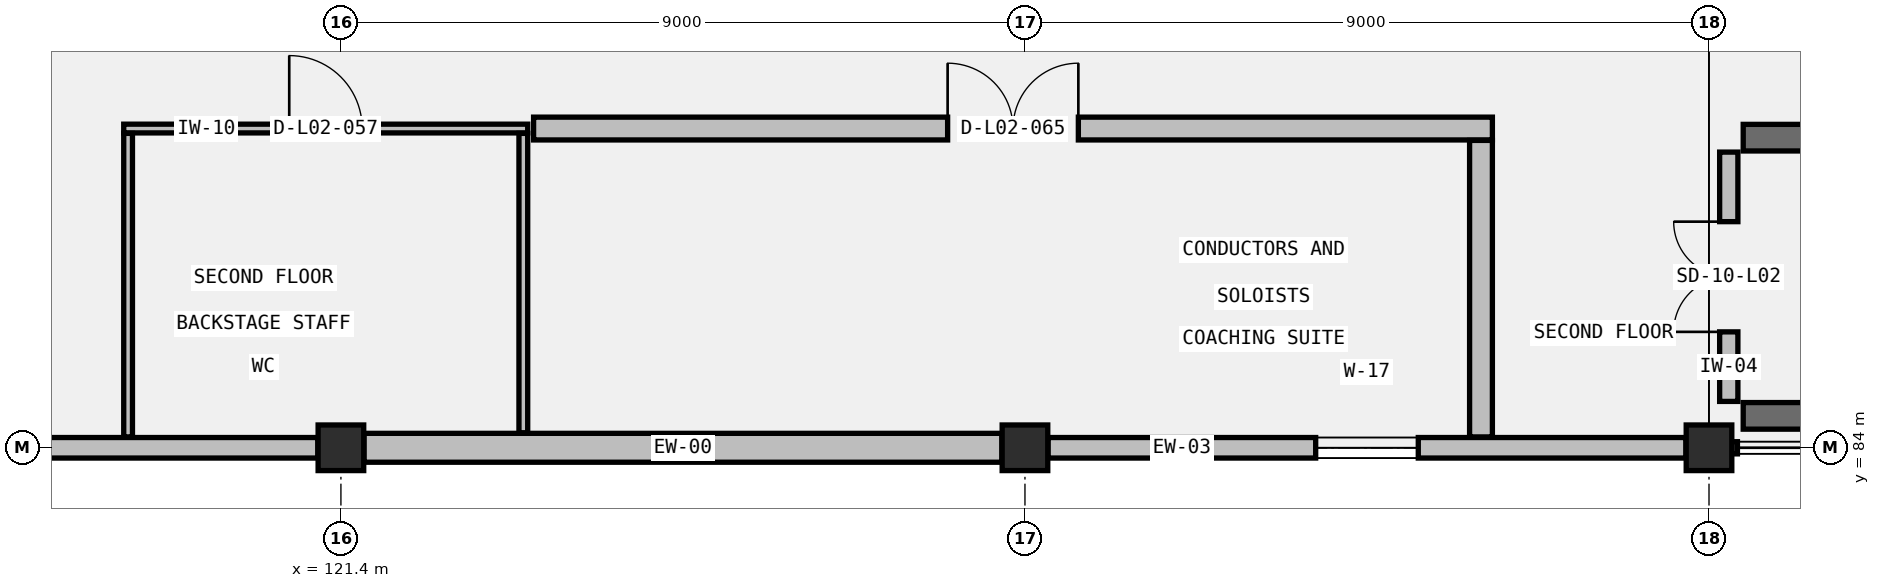
"""IFC4 building model, lengths in metres.
Left out: names, types, materials, properties, quantities, classifications, styles, units other than length and angle.
Written with IfcOpenShell. Run it as: python <this file> out.ifc"""

import sys

from ifc_helpers import new_model, si_unit, direction, frame, frame_2d, origin, origin_2d, place, context, subcontext, project, spatial, rectangle, extrude, element, fill, save


model = new_model("IFC4")
c1 = context("Model", 3, precision=1e-05, world=origin(), true_north=direction((0.0, 1.0)))
c2 = subcontext(c1, "Body", "Model", "MODEL_VIEW")
j1 = project(units=[si_unit("LENGTHUNIT", "METRE"), si_unit("PLANEANGLEUNIT", "RADIAN")], contexts=[c1])
p1 = place(None, origin())
s1 = spatial("IfcSite", under=j1, at=p1, CompositionType="ELEMENT")
p2 = place(p1, origin())
s2 = spatial("IfcBuilding", under=s1, at=p2, CompositionType="ELEMENT")
p3 = place(p2, frame((0.0, 0.0, 10.0)))
s3 = spatial("IfcBuildingStorey", under=s2, at=p3, CompositionType="ELEMENT", Elevation=10.0)
for number, where, z_axis, x_axis in (
    (1, (121.4, 84.0, 0.0), (0.0, 0.0, 1.0), (1.0, 0.0, 0.0)),
    (2, (130.4, 84.0, 0.0), (0.0, 0.0, 1.0), (1.0, 0.0, 0.0)),
    (3, (139.4, 84.0, 0.0), (0.0, 0.0, 1.0), (1.0, 0.0, 0.0)),
):
    element("IfcColumn", number, at=place(p3, frame(where, z_axis=z_axis, x_axis=x_axis)), inside=s3, PredefinedType="COLUMN", context=c2, shape_type="SweptSolid", body=[
        extrude(rectangle(XDim=0.6, YDim=0.6, at=origin_2d()), origin(), (0.0, 0.0, 1.0), 4.6),
    ])
for number, where, z_axis, x_axis in (
    (4, (139.85, 84.42, 0.0), (0.0, 0.0, 1.0), (1.0, 0.0, 0.0)),
    (5, (148.0, 88.08, 0.0), (0.0, 0.0, 1.0), (-1.0, 0.0, 0.0)),
):
    element("IfcWall", number, at=place(p3, frame(where, z_axis=z_axis, x_axis=x_axis)), inside=s3, PredefinedType="SHEAR", context=c2, shape_type="SweptSolid", body=[
        extrude(rectangle(XDim=8.15, YDim=0.35, at=frame_2d((4.075, 0.0))), origin(), (0.0, 0.0, 1.0), 4.36),
    ])
p4 = place(p3, frame((112.779, 84.0, 0.0), z_axis=(0.0, 0.0, 1.0), x_axis=(1.0, 0.0, 0.0)))
e6 = element("IfcWall", 6, at=p4, inside=s3, PredefinedType="STANDARD", context=c2, shape_type="SweptSolid", body=[
    extrude(rectangle(XDim=8.317, YDim=0.27, at=frame_2d((4.158, 0.0))), origin(), (0.0, 0.0, 1.0), 3.738),
])
p5 = place(p4, frame((3.684, 0.0, 0.95)))
e7 = element("IfcOpeningElement", 7, at=p5, cuts=e6, PredefinedType="OPENING", context=c2, shape_type="SweptSolid", body=[
    extrude(rectangle(XDim=0.95, YDim=1.55, at=frame_2d((0.475, 0.775))), frame((0.0, 0.145, 0.0), z_axis=(0.0, -1.0, 0.0), x_axis=(1.0, 0.0, 0.0)), (0.0, 0.0, 1.0), 0.29),
])
p6 = place(p3, frame((121.704, 84.0, 0.0), z_axis=(0.0, 0.0, 1.0), x_axis=(1.0, 0.0, 0.0)))
e8 = element("IfcWall", 8, at=p6, inside=s3, PredefinedType="STANDARD", context=c2, shape_type="SweptSolid", body=[
    extrude(rectangle(XDim=8.392, YDim=0.38, at=frame_2d((4.196, 0.0))), origin(), (0.0, 0.0, 1.0), 3.738),
])
p7 = place(p3, frame((130.704, 84.0, 0.0), z_axis=(0.0, 0.0, 1.0), x_axis=(1.0, 0.0, 0.0)))
e9 = element("IfcWall", 9, at=p7, inside=s3, PredefinedType="STANDARD", context=c2, shape_type="SweptSolid", body=[
    extrude(rectangle(XDim=8.392, YDim=0.27, at=frame_2d((4.196, 0.0))), origin(), (0.0, 0.0, 1.0), 3.738),
])
p8 = place(p7, frame((3.521, 0.0, 0.95)))
e10 = element("IfcOpeningElement", 10, at=p8, cuts=e9, PredefinedType="OPENING", context=c2, shape_type="SweptSolid", body=[
    extrude(rectangle(XDim=1.35, YDim=1.85, at=frame_2d((0.675, 0.925))), frame((0.0, 0.145, 0.0), z_axis=(0.0, -1.0, 0.0), x_axis=(1.0, 0.0, 0.0)), (0.0, 0.0, 1.0), 0.29),
])
p9 = place(p3, frame((139.66, 84.61, 0.0), z_axis=(0.0, 0.0, 1.0), x_axis=(0.0, 1.0, 0.0)))
e11 = element("IfcWall", 11, at=p9, inside=s3, PredefinedType="STANDARD", context=c2, shape_type="SweptSolid", body=[
    extrude(rectangle(XDim=3.28, YDim=0.24, at=frame_2d((1.64, 0.0))), origin(), (0.0, 0.0, 1.0), 4.36),
])
p10 = place(p9, frame((0.915, 0.0, 0.0)))
e12 = element("IfcOpeningElement", 12, at=p10, cuts=e11, PredefinedType="OPENING", context=c2, shape_type="SweptSolid", body=[
    extrude(rectangle(XDim=1.45, YDim=2.2, at=frame_2d((0.725, 1.1))), frame((0.0, 0.13, 0.0), z_axis=(0.0, -1.0, 0.0), x_axis=(1.0, 0.0, 0.0)), (0.0, 0.0, 1.0), 0.26),
])
p11 = place(p3, frame((118.542, 88.2, 0.0), z_axis=(0.0, 0.0, 1.0), x_axis=(1.0, 0.0, 0.0)))
e13 = element("IfcWall", 13, at=p11, inside=s3, PredefinedType="PARTITIONING", context=c2, shape_type="SweptSolid", body=[
    extrude(rectangle(XDim=5.315, YDim=0.115, at=frame_2d((2.657, 0.0))), origin(), (0.0, 0.0, 1.0), 3.738),
])
p12 = place(p11, frame((2.177, 0.0, 0.0)))
e14 = element("IfcOpeningElement", 14, at=p12, cuts=e13, PredefinedType="OPENING", context=c2, shape_type="SweptSolid", body=[
    extrude(rectangle(XDim=0.96, YDim=2.08, at=frame_2d((0.48, 1.04))), frame((0.0, 0.067, 0.0), z_axis=(0.0, -1.0, 0.0), x_axis=(1.0, 0.0, 0.0)), (0.0, 0.0, 1.0), 0.135),
])
p13 = place(p3, frame((123.8, 84.198, 0.0), z_axis=(0.0, 0.0, 1.0), x_axis=(0.0, 1.0, 0.0)))
e15 = element("IfcWall", 15, at=p13, inside=s3, PredefinedType="PARTITIONING", context=c2, shape_type="SweptSolid", body=[
    extrude(rectangle(XDim=3.938, YDim=0.115, at=frame_2d((1.969, 0.0))), origin(), (0.0, 0.0, 1.0), 3.738),
])
p14 = place(p3, frame((118.6, 84.143, 0.0), z_axis=(0.0, 0.0, 1.0), x_axis=(0.0, 1.0, 0.0)))
e16 = element("IfcWall", 16, at=p14, inside=s3, PredefinedType="PARTITIONING", context=c2, shape_type="SweptSolid", body=[
    extrude(rectangle(XDim=3.993, YDim=0.115, at=frame_2d((1.997, 0.0))), origin(), (0.0, 0.0, 1.0), 3.898),
])
p15 = place(p3, frame((123.935, 88.2, 0.0), z_axis=(0.0, 0.0, 1.0), x_axis=(1.0, 0.0, 0.0)))
e17 = element("IfcWall", 17, at=p15, inside=s3, PredefinedType="PARTITIONING", context=c2, shape_type="SweptSolid", body=[
    extrude(rectangle(XDim=12.615, YDim=0.3, at=frame_2d((6.308, 0.0))), origin(), (0.0, 0.0, 1.0), 3.738),
])
p16 = place(p15, frame((5.448, 0.0, 0.0)))
e18 = element("IfcOpeningElement", 18, at=p16, cuts=e17, PredefinedType="OPENING", context=c2, shape_type="SweptSolid", body=[
    extrude(rectangle(XDim=1.72, YDim=2.38, at=frame_2d((0.86, 1.19))), frame((0.0, 0.16, 0.0), z_axis=(0.0, -1.0, 0.0), x_axis=(1.0, 0.0, 0.0)), (0.0, 0.0, 1.0), 0.32),
])
p17 = place(p3, frame((136.4, 84.143, 0.0), z_axis=(0.0, 0.0, 1.0), x_axis=(0.0, 1.0, 0.0)))
e19 = element("IfcWall", 19, at=p17, inside=s3, PredefinedType="PARTITIONING", context=c2, shape_type="SweptSolid", body=[
    extrude(rectangle(XDim=3.901, YDim=0.3, at=frame_2d((1.95, 0.0))), origin(), (0.0, 0.0, 1.0), 3.898),
])
p18 = place(p8, origin())
e20 = element("IfcWindow", 20, at=p18, inside=s3, PartitioningType="SINGLE_PANEL", PredefinedType="WINDOW", context=c2, shape_type="SweptSolid", body=[
    extrude(rectangle(XDim=1.35, YDim=1.85, at=frame_2d((0.675, 0.925))), frame((0.0, 0.03, 0.0), z_axis=(0.0, -1.0, 0.0), x_axis=(1.0, 0.0, 0.0)), (0.0, 0.0, 1.0), 0.06),
])
fill(e10, e20)
p19 = place(p10, origin())
e21 = element("IfcDoor", 21, at=p19, inside=s3, OperationType="DOUBLE_DOOR_SINGLE_SWING", PredefinedType="DOOR", context=c2, shape_type="SweptSolid", body=[
    extrude(rectangle(XDim=1.45, YDim=2.2, at=frame_2d((0.725, 1.1))), frame((0.0, 0.025, 0.0), z_axis=(0.0, -1.0, 0.0), x_axis=(1.0, 0.0, 0.0)), (0.0, 0.0, 1.0), 0.05),
])
fill(e12, e21)
p20 = place(p12, origin())
e22 = element("IfcDoor", 22, at=p20, inside=s3, OperationType="SINGLE_SWING_LEFT", PredefinedType="DOOR", context=c2, shape_type="SweptSolid", body=[
    extrude(rectangle(XDim=0.96, YDim=2.08, at=frame_2d((0.48, 1.04))), frame((0.0, 0.025, 0.0), z_axis=(0.0, -1.0, 0.0), x_axis=(1.0, 0.0, 0.0)), (0.0, 0.0, 1.0), 0.05),
])
fill(e14, e22)
p21 = place(p16, origin())
e23 = element("IfcDoor", 23, at=p21, inside=s3, OperationType="DOUBLE_DOOR_SINGLE_SWING", PredefinedType="DOOR", context=c2, shape_type="SweptSolid", body=[
    extrude(rectangle(XDim=1.72, YDim=2.38, at=frame_2d((0.86, 1.19))), frame((0.0, 0.025, 0.0), z_axis=(0.0, -1.0, 0.0), x_axis=(1.0, 0.0, 0.0)), (0.0, 0.0, 1.0), 0.05),
])
fill(e18, e23)
save(model, sys.argv[1])
